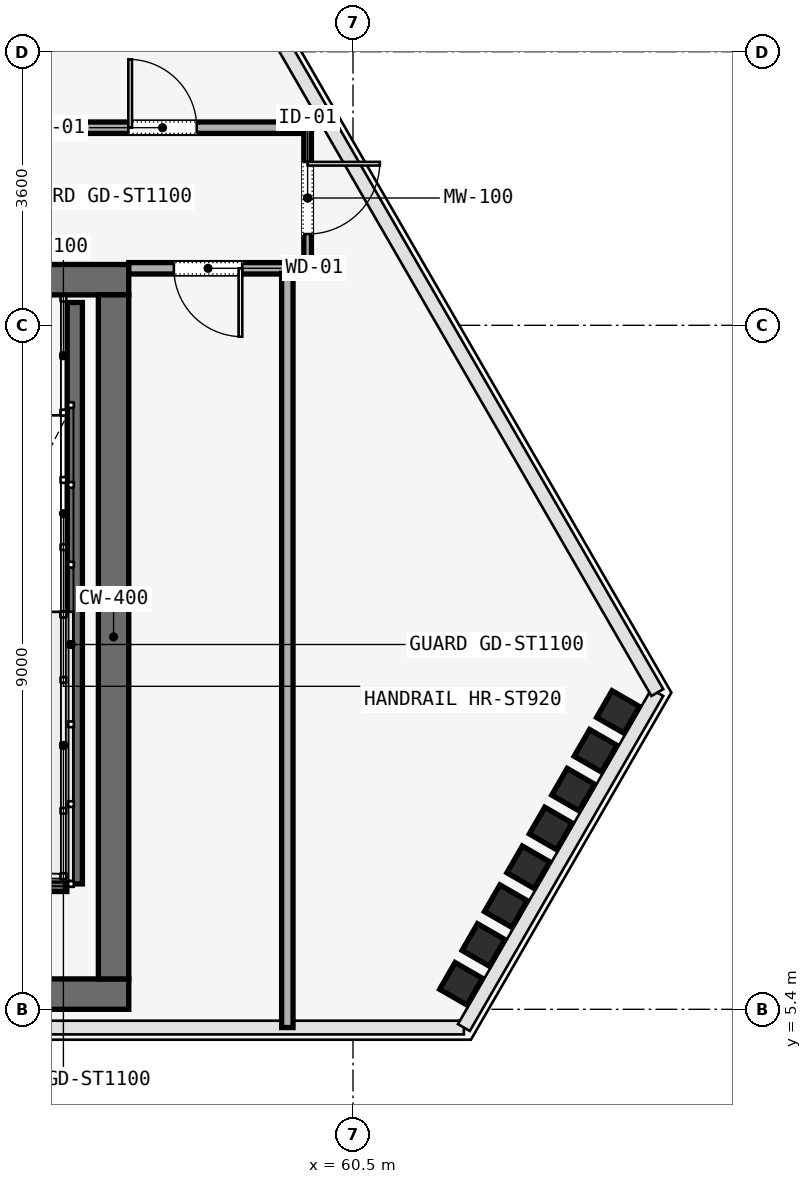
"""IFC4 building model, lengths in metres.
Left out: names, types, materials, properties, quantities, classifications, styles, units other than length and angle.
Written with IfcOpenShell. Run it as: python <this file> out.ifc"""

import sys

from ifc_helpers import new_model, si_unit, direction, frame, frame_2d, origin, origin_2d, place, context, subcontext, project, spatial, rectangle, i_section, extrude, element, fill, save


model = new_model("IFC4")
c1 = context("Model", 3, precision=1e-05, world=origin(), true_north=direction((0.0, 1.0)))
c2 = subcontext(c1, "Body", "Model", "MODEL_VIEW")
j1 = project(units=[si_unit("LENGTHUNIT", "METRE"), si_unit("PLANEANGLEUNIT", "RADIAN")], contexts=[c1])
p1 = place(None, origin())
s1 = spatial("IfcSite", under=j1, at=p1, CompositionType="ELEMENT")
p2 = place(p1, origin())
s2 = spatial("IfcBuilding", under=s1, at=p2, CompositionType="ELEMENT")
p3 = place(p2, frame((0.0, 0.0, 271.2)))
s3 = spatial("IfcBuildingStorey", under=s2, at=p3, CompositionType="ELEMENT", Elevation=271.2)
p4 = place(p3, frame((26.45, 15.0, 0.0), z_axis=(0.0, 0.0, 1.0), x_axis=(1.0, 0.0, 0.0)))
e1 = element("IfcWall", 1, at=p4, inside=s3, PredefinedType="SOLIDWALL", context=c2, shape_type="SweptSolid", body=[
    extrude(rectangle(XDim=31.1, YDim=0.4, at=frame_2d((15.55, 0.0))), origin(), (0.0, 0.0, 1.0), 3.58),
])
p5 = place(p4, frame((1.65, 0.0, 0.0)))
e2 = element("IfcOpeningElement", 2, at=p5, cuts=e1, PredefinedType="OPENING", context=c2, shape_type="SweptSolid", body=[
    extrude(rectangle(XDim=1.1, YDim=2.2, at=frame_2d((0.55, 1.1))), frame((0.0, 0.2, 0.0), z_axis=(0.0, -1.0, 0.0), x_axis=(1.0, 0.0, 0.0)), (0.0, 0.0, 1.0), 0.4),
])
p6 = place(p4, frame((13.65, 0.0, 0.0)))
e3 = element("IfcOpeningElement", 3, at=p6, cuts=e1, PredefinedType="OPENING", context=c2, shape_type="SweptSolid", body=[
    extrude(rectangle(XDim=1.1, YDim=2.2, at=frame_2d((0.55, 1.1))), frame((0.0, 0.2, 0.0), z_axis=(0.0, -1.0, 0.0), x_axis=(1.0, 0.0, 0.0)), (0.0, 0.0, 1.0), 0.4),
])
p7 = place(p4, frame((25.55, 0.0, 0.0)))
e4 = element("IfcOpeningElement", 4, at=p7, cuts=e1, PredefinedType="OPENING", context=c2, shape_type="SweptSolid", body=[
    extrude(rectangle(XDim=1.1, YDim=2.2, at=frame_2d((0.55, 1.1))), frame((0.0, 0.2, 0.0), z_axis=(0.0, -1.0, 0.0), x_axis=(1.0, 0.0, 0.0)), (0.0, 0.0, 1.0), 0.4),
])
p8 = place(p4, frame((19.35, 0.0, 0.0)))
e5 = element("IfcOpeningElement", 5, at=p8, cuts=e1, PredefinedType="OPENING", context=c2, shape_type="SweptSolid", body=[
    extrude(rectangle(XDim=1.1, YDim=2.2, at=frame_2d((0.55, 1.1))), frame((0.0, 0.2, 0.0), z_axis=(0.0, -1.0, 0.0), x_axis=(1.0, 0.0, 0.0)), (0.0, 0.0, 1.0), 0.4),
])
p9 = place(p4, frame((21.4, 0.0, 0.0)))
e6 = element("IfcOpeningElement", 6, at=p9, cuts=e1, PredefinedType="OPENING", context=c2, shape_type="SweptSolid", body=[
    extrude(rectangle(XDim=0.9, YDim=2.1, at=frame_2d((0.45, 1.05))), frame((0.0, 0.2, 0.0), z_axis=(0.0, -1.0, 0.0), x_axis=(1.0, 0.0, 0.0)), (0.0, 0.0, 1.0), 0.4),
])
p10 = place(p4, frame((6.04, 0.0, 0.0)))
e7 = element("IfcOpeningElement", 7, at=p10, cuts=e1, PredefinedType="OPENING", context=c2, shape_type="SweptSolid", body=[
    extrude(rectangle(XDim=0.95, YDim=2.2, at=frame_2d((0.475, 1.1))), frame((0.0, 0.2, 0.0), z_axis=(0.0, -1.0, 0.0), x_axis=(1.0, 0.0, 0.0)), (0.0, 0.0, 1.0), 0.4),
])
p11 = place(p4, frame((9.99, 0.0, 0.0)))
e8 = element("IfcOpeningElement", 8, at=p11, cuts=e1, PredefinedType="OPENING", context=c2, shape_type="SweptSolid", body=[
    extrude(rectangle(XDim=0.95, YDim=2.2, at=frame_2d((0.475, 1.1))), frame((0.0, 0.2, 0.0), z_axis=(0.0, -1.0, 0.0), x_axis=(1.0, 0.0, 0.0)), (0.0, 0.0, 1.0), 0.4),
])
p12 = place(p4, frame((23.35, 0.0, 0.0)))
e9 = element("IfcOpeningElement", 9, at=p12, cuts=e1, PredefinedType="OPENING", context=c2, shape_type="SweptSolid", body=[
    extrude(rectangle(XDim=1.3, YDim=2.3, at=frame_2d((0.65, 1.15))), frame((0.0, 0.2, 0.0), z_axis=(0.0, -1.0, 0.0), x_axis=(1.0, 0.0, 0.0)), (0.0, 0.0, 1.0), 0.4),
])
p13 = place(p3, frame((26.45, 5.6, 0.0), z_axis=(0.0, 0.0, 1.0), x_axis=(1.0, 0.0, 0.0)))
e10 = element("IfcWall", 10, at=p13, inside=s3, PredefinedType="SOLIDWALL", context=c2, shape_type="SweptSolid", body=[
    extrude(rectangle(XDim=31.1, YDim=0.4, at=frame_2d((15.55, 0.0))), origin(), (0.0, 0.0, 1.0), 3.58),
])
p14 = place(p3, frame((57.35, 5.8, 0.0), z_axis=(0.0, 0.0, 1.0), x_axis=(0.0, 1.0, 0.0)))
e11 = element("IfcWall", 11, at=p14, inside=s3, PredefinedType="SOLIDWALL", context=c2, shape_type="SweptSolid", body=[
    extrude(rectangle(XDim=9.0, YDim=0.4, at=frame_2d((4.5, 0.0))), origin(), (0.0, 0.0, 1.0), 3.58),
])
for number, where, z_axis, x_axis in (
    (12, (61.922, 5.736, 0.0), (0.0, 0.0, 1.0), (0.5, 0.866, 0.0)),
    (13, (62.217, 6.246, 0.0), (0.0, 0.0, 1.0), (0.5, 0.866, 0.0)),
    (14, (62.512, 6.757, 0.0), (0.0, 0.0, 1.0), (0.5, 0.866, 0.0)),
    (15, (62.807, 7.268, 0.0), (0.0, 0.0, 1.0), (0.5, 0.866, 0.0)),
    (16, (63.102, 7.779, 0.0), (0.0, 0.0, 1.0), (0.5, 0.866, 0.0)),
    (17, (63.397, 8.29, 0.0), (0.0, 0.0, 1.0), (0.5, 0.866, 0.0)),
    (18, (63.692, 8.801, 0.0), (0.0, 0.0, 1.0), (0.5, 0.866, 0.0)),
    (19, (63.987, 9.312, 0.0), (0.0, 0.0, 1.0), (0.5, 0.866, 0.0)),
):
    element("IfcColumn", number, at=place(p3, frame(where, z_axis=z_axis, x_axis=x_axis)), inside=s3, PredefinedType="COLUMN", context=c2, shape_type="SweptSolid", body=[
        extrude(i_section(OverallWidth=0.406, OverallDepth=0.416, WebThickness=0.03, FlangeThickness=0.037, FilletRadius=0.015, at=origin_2d()), origin(), (0.0, 0.0, 1.0), 3.58),
    ])
p15 = place(p3, frame((56.84, 14.7, 0.0), z_axis=(0.0, 0.0, 1.0), x_axis=(0.0, -1.0, 0.0)))
e20 = element("IfcWall", 20, at=p15, inside=s3, PredefinedType="SOLIDWALL", context=c2, shape_type="SweptSolid", body=[
    extrude(rectangle(XDim=7.65, YDim=0.2, at=frame_2d((3.825, 0.0))), origin(), (0.0, 0.0, 1.0), 3.8),
])
p16 = place(p3, frame((53.62, 7.05, 0.0), z_axis=(0.0, 0.0, 1.0), x_axis=(1.0, 0.0, 0.0)))
e21 = element("IfcWall", 21, at=p16, inside=s3, PredefinedType="SOLIDWALL", context=c2, shape_type="SweptSolid", body=[
    extrude(rectangle(XDim=3.115, YDim=0.2, at=frame_2d((1.558, 0.0))), origin(), (0.0, 0.0, 1.0), 3.8),
])
p17 = place(p3, frame((59.903, 17.0, 0.0), z_axis=(0.0, 0.0, 1.0), x_axis=(0.0, -1.0, 0.0)))
e22 = element("IfcWall", 22, at=p17, inside=s3, PredefinedType="MOVABLE", context=c2, shape_type="SweptSolid", body=[
    extrude(rectangle(XDim=1.85, YDim=0.1, at=frame_2d((0.925, 0.0))), origin(), (0.0, 0.0, 1.0), 3.01),
])
p18 = place(p17, frame((0.45, 0.0, 0.0)))
e23 = element("IfcOpeningElement", 23, at=p18, cuts=e22, PredefinedType="OPENING", context=c2, shape_type="SweptSolid", body=[
    extrude(rectangle(XDim=0.95, YDim=2.2, at=frame_2d((0.475, 1.1))), frame((0.0, 0.05, 0.0), z_axis=(0.0, -1.0, 0.0), x_axis=(1.0, 0.0, 0.0)), (0.0, 0.0, 1.0), 0.1),
])
p19 = place(p3, frame((59.636, 15.15, 0.0), z_axis=(0.0, 0.0, 1.0), x_axis=(-1.0, 0.0, 0.0)))
e24 = element("IfcWall", 24, at=p19, inside=s3, PredefinedType="PARTITIONING", context=c2, shape_type="SweptSolid", body=[
    extrude(rectangle(XDim=2.086, YDim=0.15, at=frame_2d((1.043, 0.0))), origin(), (0.0, 0.0, 1.0), 3.01),
])
p20 = place(p19, frame((0.593, 0.0, 0.0)))
e25 = element("IfcOpeningElement", 25, at=p20, cuts=e24, PredefinedType="OPENING", context=c2, shape_type="SweptSolid", body=[
    extrude(rectangle(XDim=0.9, YDim=2.15, at=frame_2d((0.45, 1.075))), frame((0.0, 0.075, 0.0), z_axis=(0.0, -1.0, 0.0), x_axis=(1.0, 0.0, 0.0)), (0.0, 0.0, 1.0), 0.15),
])
p21 = place(p3, frame((56.15, 17.0, 0.0), z_axis=(0.0, 0.0, 1.0), x_axis=(1.0, 0.0, 0.0)))
e26 = element("IfcWall", 26, at=p21, inside=s3, PredefinedType="PARTITIONING", context=c2, shape_type="SweptSolid", body=[
    extrude(rectangle(XDim=3.688, YDim=0.15, at=frame_2d((1.844, 0.0))), origin(), (0.0, 0.0, 1.0), 3.01),
])
p22 = place(p21, frame((1.394, 0.0, 0.0)))
e27 = element("IfcOpeningElement", 27, at=p22, cuts=e26, PredefinedType="OPENING", context=c2, shape_type="SweptSolid", body=[
    extrude(rectangle(XDim=0.9, YDim=2.15, at=frame_2d((0.45, 1.075))), frame((0.0, 0.075, 0.0), z_axis=(0.0, -1.0, 0.0), x_axis=(1.0, 0.0, 0.0)), (0.0, 0.0, 1.0), 0.15),
])
p23 = place(p3, frame((59.636, 15.085, 0.0), z_axis=(0.0, 0.0, 1.0), x_axis=(0.0, -1.0, 0.0)))
e28 = element("IfcWall", 28, at=p23, inside=s3, PredefinedType="PARTITIONING", context=c2, shape_type="SweptSolid", body=[
    extrude(rectangle(XDim=9.925, YDim=0.15, at=frame_2d((4.962, 0.0))), origin(), (0.0, 0.0, 1.0), 3.01),
])
p24 = place(p20, origin())
e29 = element("IfcDoor", 29, at=p24, inside=s3, OperationType="SINGLE_SWING_LEFT", PredefinedType="DOOR", context=c2, shape_type="SweptSolid", body=[
    extrude(rectangle(XDim=0.9, YDim=2.15, at=frame_2d((0.45, 1.075))), frame((0.0, 0.025, 0.0), z_axis=(0.0, -1.0, 0.0), x_axis=(1.0, 0.0, 0.0)), (0.0, 0.0, 1.0), 0.05),
])
fill(e25, e29)
p25 = place(p18, origin())
e30 = element("IfcDoor", 30, at=p25, inside=s3, OperationType="SINGLE_SWING_LEFT", PredefinedType="DOOR", context=c2, shape_type="SweptSolid", body=[
    extrude(rectangle(XDim=0.95, YDim=2.2, at=frame_2d((0.475, 1.1))), frame((0.0, 0.025, 0.0), z_axis=(0.0, -1.0, 0.0), x_axis=(1.0, 0.0, 0.0)), (0.0, 0.0, 1.0), 0.05),
])
fill(e23, e30)
p26 = place(p22, origin())
e31 = element("IfcDoor", 31, at=p26, inside=s3, OperationType="SINGLE_SWING_RIGHT", PredefinedType="DOOR", context=c2, shape_type="SweptSolid", body=[
    extrude(rectangle(XDim=0.9, YDim=2.15, at=frame_2d((0.45, 1.075))), frame((0.0, 0.025, 0.0), z_axis=(0.0, -1.0, 0.0), x_axis=(1.0, 0.0, 0.0)), (0.0, 0.0, 1.0), 0.05),
])
fill(e27, e31)
save(model, sys.argv[1])
